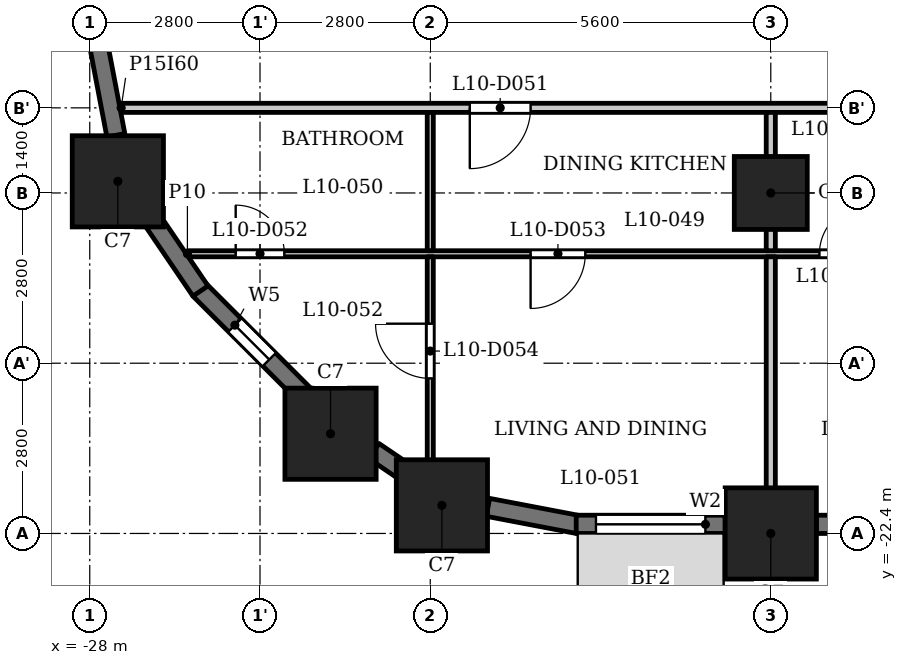
"""IFC4 building model, lengths in metres.
Left out: names, types, materials, properties, quantities, classifications, styles, units other than length and angle.
Written with IfcOpenShell. Run it as: python <this file> out.ifc"""

import sys

from ifc_helpers import new_model, si_unit, direction, frame, frame_2d, origin, origin_2d, place, context, subcontext, project, spatial, rectangle, extrude, element, fill, save


model = new_model("IFC4")
c1 = context("Model", 3, precision=1e-05, world=origin(), true_north=direction((0.0, 1.0)))
c2 = subcontext(c1, "Body", "Model", "MODEL_VIEW")
j1 = project(units=[si_unit("LENGTHUNIT", "METRE"), si_unit("PLANEANGLEUNIT", "RADIAN")], contexts=[c1])
p1 = place(None, origin())
s1 = spatial("IfcSite", under=j1, at=p1, CompositionType="ELEMENT")
p2 = place(p1, origin())
s2 = spatial("IfcBuilding", under=s1, at=p2, CompositionType="ELEMENT")
p3 = place(p2, frame((0.0, 0.0, 44.5)))
s3 = spatial("IfcBuildingStorey", under=s2, at=p3, CompositionType="ELEMENT", Elevation=44.5)
for number, where, z_axis, x_axis in (
    (1, (-22.209, -21.938, 0.0), (0.0, 0.0, 1.0), (1.0, 0.0, 0.0)),
    (2, (-16.8, -22.4, 0.0), (0.0, 0.0, 1.0), (1.0, 0.0, 0.0)),
    (3, (-27.538, -16.609, 0.0), (0.0, 0.0, 1.0), (1.0, 0.0, 0.0)),
    (4, (-24.04, -20.76, 0.0), (0.0, 0.0, 1.0), (1.0, 0.0, 0.0)),
):
    element("IfcColumn", number, at=place(p3, frame(where, z_axis=z_axis, x_axis=x_axis)), inside=s3, PredefinedType="COLUMN", context=c2, shape_type="SweptSolid", body=[
        extrude(rectangle(XDim=1.5, YDim=1.5, at=origin_2d()), origin(), (0.0, 0.0, 1.0), 3.5),
    ])
p4 = place(p3, frame((-16.8, -16.8, 0.0), z_axis=(0.0, 0.0, 1.0), x_axis=(1.0, 0.0, 0.0)))
e5 = element("IfcColumn", 5, at=p4, inside=s3, PredefinedType="COLUMN", context=c2, shape_type="SweptSolid", body=[
    extrude(rectangle(XDim=1.2, YDim=1.2, at=origin_2d()), origin(), (0.0, 0.0, 1.0), 3.5),
])
p5 = place(p3, frame((-26.197, -18.391, 0.0), z_axis=(0.0, 0.0, 1.0), x_axis=(0.707106781187, -0.707106781187, 0.0)))
e6 = element("IfcWall", 6, at=p5, inside=s3, PredefinedType="SOLIDWALL", context=c2, shape_type="SweptSolid", body=[
    extrude(rectangle(XDim=2.45, YDim=0.3, at=frame_2d((1.225, 0.0))), origin(), (0.0, 0.0, 1.0), 2.35),
])
p6 = place(p5, frame((0.825, 0.0, 0.6)))
e7 = element("IfcOpeningElement", 7, at=p6, cuts=e6, PredefinedType="OPENING", context=c2, shape_type="SweptSolid", body=[
    extrude(rectangle(XDim=0.8, YDim=1.55, at=frame_2d((0.4, 0.775))), frame((0.0, 0.16, 0.0), z_axis=(0.0, -1.0, 0.0), x_axis=(1.0, 0.0, 0.0)), (0.0, 0.0, 1.0), 0.32),
])
p7 = place(p3, frame((-23.327, -21.045, 0.0), z_axis=(0.0, 0.0, 1.0), x_axis=(0.827080706709, -0.562083182981, 0.0)))
e8 = element("IfcWall", 8, at=p7, inside=s3, PredefinedType="SOLIDWALL", context=c2, shape_type="SweptSolid", body=[
    extrude(rectangle(XDim=0.677, YDim=0.3, at=frame_2d((0.339, 0.0))), origin(), (0.0, 0.0, 1.0), 3.2),
])
p8 = place(p3, frame((-21.451, -21.97, 0.0), z_axis=(0.0, 0.0, 1.0), x_axis=(0.982287454367, -0.187380247071, 0.0)))
e9 = element("IfcWall", 9, at=p8, inside=s3, PredefinedType="SOLIDWALL", context=c2, shape_type="SweptSolid", body=[
    extrude(rectangle(XDim=1.506, YDim=0.3, at=frame_2d((0.753, 0.0))), origin(), (0.0, 0.0, 1.0), 2.35),
])
p9 = place(p3, frame((-20.0, -22.25, 0.0), z_axis=(0.0, 0.0, 1.0), x_axis=(1.0, 0.0, 0.0)))
e10 = element("IfcWall", 10, at=p9, inside=s3, PredefinedType="SOLIDWALL", context=c2, shape_type="SweptSolid", body=[
    extrude(rectangle(XDim=2.45, YDim=0.3, at=frame_2d((1.225, 0.0))), origin(), (0.0, 0.0, 1.0), 2.35),
])
p10 = place(p9, frame((0.325, 0.0, 0.9)))
e11 = element("IfcOpeningElement", 11, at=p10, cuts=e10, PredefinedType="OPENING", context=c2, shape_type="SweptSolid", body=[
    extrude(rectangle(XDim=1.8, YDim=1.25, at=frame_2d((0.9, 0.625))), frame((0.0, 0.16, 0.0), z_axis=(0.0, -1.0, 0.0), x_axis=(1.0, 0.0, 0.0)), (0.0, 0.0, 1.0), 0.32),
])
p11 = place(p3, frame((-16.05, -22.25, 0.0), z_axis=(0.0, 0.0, 1.0), x_axis=(1.0, 0.0, 0.0)))
e12 = element("IfcWall", 12, at=p11, inside=s3, PredefinedType="SOLIDWALL", context=c2, shape_type="SweptSolid", body=[
    extrude(rectangle(XDim=4.1, YDim=0.3, at=frame_2d((2.05, 0.0))), origin(), (0.0, 0.0, 1.0), 2.35),
])
p12 = place(p11, frame((0.25, 0.0, 1.2)))
e13 = element("IfcOpeningElement", 13, at=p12, cuts=e12, PredefinedType="OPENING", context=c2, shape_type="SweptSolid", body=[
    extrude(rectangle(XDim=3.6, YDim=0.95, at=frame_2d((1.8, 0.475))), frame((0.0, 0.16, 0.0), z_axis=(0.0, -1.0, 0.0), x_axis=(1.0, 0.0, 0.0)), (0.0, 0.0, 1.0), 0.32),
])
for number, where, z_axis, x_axis in (
    (14, (-27.853, -14.372, 0.0), (0.0, 0.0, 1.0), (0.187, -0.982, 0.0)),
    (15, (-27.025, -17.167, 0.0), (0.0, 0.0, 1.0), (0.562, -0.827, 0.0)),
):
    element("IfcWall", number, at=place(p3, frame(where, z_axis=z_axis, x_axis=x_axis)), inside=s3, PredefinedType="SOLIDWALL", context=c2, shape_type="SweptSolid", body=[
        extrude(rectangle(XDim=1.506, YDim=0.3, at=frame_2d((0.753, 0.0))), origin(), (0.0, 0.0, 1.0), 2.35),
    ])
p13 = place(p3, frame((-26.394, -17.8, 0.0), z_axis=(0.0, 0.0, 1.0), x_axis=(1.0, 0.0, 0.0)))
e16 = element("IfcWall", 16, at=p13, inside=s3, PredefinedType="PARTITIONING", context=c2, shape_type="SweptSolid", body=[
    extrude(rectangle(XDim=53.126, YDim=0.1, at=frame_2d((26.563, 0.0))), origin(), (0.0, 0.0, 1.0), 3.2),
])
p14 = place(p13, frame((0.794, 0.0, 0.0)))
e17 = element("IfcOpeningElement", 17, at=p14, cuts=e16, PredefinedType="OPENING", context=c2, shape_type="SweptSolid", body=[
    extrude(rectangle(XDim=0.8, YDim=2.1, at=frame_2d((0.4, 1.05))), frame((0.0, 0.06, 0.0), z_axis=(0.0, -1.0, 0.0), x_axis=(1.0, 0.0, 0.0)), (0.0, 0.0, 1.0), 0.12),
])
p15 = place(p13, frame((5.644, 0.0, 0.0)))
e18 = element("IfcOpeningElement", 18, at=p15, cuts=e16, PredefinedType="OPENING", context=c2, shape_type="SweptSolid", body=[
    extrude(rectangle(XDim=0.9, YDim=2.1, at=frame_2d((0.45, 1.05))), frame((0.0, 0.06, 0.0), z_axis=(0.0, -1.0, 0.0), x_axis=(1.0, 0.0, 0.0)), (0.0, 0.0, 1.0), 0.12),
])
p16 = place(p13, frame((10.394, 0.0, 0.0)))
e19 = element("IfcOpeningElement", 19, at=p16, cuts=e16, PredefinedType="OPENING", context=c2, shape_type="SweptSolid", body=[
    extrude(rectangle(XDim=0.8, YDim=2.1, at=frame_2d((0.4, 1.05))), frame((0.0, 0.06, 0.0), z_axis=(0.0, -1.0, 0.0), x_axis=(1.0, 0.0, 0.0)), (0.0, 0.0, 1.0), 0.12),
])
p17 = place(p13, frame((13.244, 0.0, 0.0)))
e20 = element("IfcOpeningElement", 20, at=p17, cuts=e16, PredefinedType="OPENING", context=c2, shape_type="SweptSolid", body=[
    extrude(rectangle(XDim=0.9, YDim=2.1, at=frame_2d((0.45, 1.05))), frame((0.0, 0.06, 0.0), z_axis=(0.0, -1.0, 0.0), x_axis=(1.0, 0.0, 0.0)), (0.0, 0.0, 1.0), 0.12),
])
p18 = place(p13, frame((23.944, 0.0, 0.0)))
e21 = element("IfcOpeningElement", 21, at=p18, cuts=e16, PredefinedType="OPENING", context=c2, shape_type="SweptSolid", body=[
    extrude(rectangle(XDim=0.8, YDim=2.1, at=frame_2d((0.4, 1.05))), frame((0.0, 0.06, 0.0), z_axis=(0.0, -1.0, 0.0), x_axis=(1.0, 0.0, 0.0)), (0.0, 0.0, 1.0), 0.12),
])
p19 = place(p13, frame((22.194, 0.0, 0.0)))
e22 = element("IfcOpeningElement", 22, at=p19, cuts=e16, PredefinedType="OPENING", context=c2, shape_type="SweptSolid", body=[
    extrude(rectangle(XDim=0.9, YDim=2.1, at=frame_2d((0.45, 1.05))), frame((0.0, 0.06, 0.0), z_axis=(0.0, -1.0, 0.0), x_axis=(1.0, 0.0, 0.0)), (0.0, 0.0, 1.0), 0.12),
])
p20 = place(p13, frame((16.594, 0.0, 0.0)))
e23 = element("IfcOpeningElement", 23, at=p20, cuts=e16, PredefinedType="OPENING", context=c2, shape_type="SweptSolid", body=[
    extrude(rectangle(XDim=0.9, YDim=2.1, at=frame_2d((0.45, 1.05))), frame((0.0, 0.06, 0.0), z_axis=(0.0, -1.0, 0.0), x_axis=(1.0, 0.0, 0.0)), (0.0, 0.0, 1.0), 0.12),
])
p21 = place(p13, frame((18.844, 0.0, 0.0)))
e24 = element("IfcOpeningElement", 24, at=p21, cuts=e16, PredefinedType="OPENING", context=c2, shape_type="SweptSolid", body=[
    extrude(rectangle(XDim=0.9, YDim=2.1, at=frame_2d((0.45, 1.05))), frame((0.0, 0.06, 0.0), z_axis=(0.0, -1.0, 0.0), x_axis=(1.0, 0.0, 0.0)), (0.0, 0.0, 1.0), 0.12),
])
p22 = place(p13, frame((30.544, 0.0, 0.0)))
e25 = element("IfcOpeningElement", 25, at=p22, cuts=e16, PredefinedType="OPENING", context=c2, shape_type="SweptSolid", body=[
    extrude(rectangle(XDim=0.8, YDim=2.1, at=frame_2d((0.4, 1.05))), frame((0.0, 0.06, 0.0), z_axis=(0.0, -1.0, 0.0), x_axis=(1.0, 0.0, 0.0)), (0.0, 0.0, 1.0), 0.12),
])
p23 = place(p13, frame((27.294, 0.0, 0.0)))
e26 = element("IfcOpeningElement", 26, at=p23, cuts=e16, PredefinedType="OPENING", context=c2, shape_type="SweptSolid", body=[
    extrude(rectangle(XDim=0.9, YDim=2.1, at=frame_2d((0.45, 1.05))), frame((0.0, 0.06, 0.0), z_axis=(0.0, -1.0, 0.0), x_axis=(1.0, 0.0, 0.0)), (0.0, 0.0, 1.0), 0.12),
])
p24 = place(p13, frame((35.894, 0.0, 0.0)))
e27 = element("IfcOpeningElement", 27, at=p24, cuts=e16, PredefinedType="OPENING", context=c2, shape_type="SweptSolid", body=[
    extrude(rectangle(XDim=0.8, YDim=2.1, at=frame_2d((0.4, 1.05))), frame((0.0, 0.06, 0.0), z_axis=(0.0, -1.0, 0.0), x_axis=(1.0, 0.0, 0.0)), (0.0, 0.0, 1.0), 0.12),
])
p25 = place(p13, frame((33.644, 0.0, 0.0)))
e28 = element("IfcOpeningElement", 28, at=p25, cuts=e16, PredefinedType="OPENING", context=c2, shape_type="SweptSolid", body=[
    extrude(rectangle(XDim=0.9, YDim=2.1, at=frame_2d((0.45, 1.05))), frame((0.0, 0.06, 0.0), z_axis=(0.0, -1.0, 0.0), x_axis=(1.0, 0.0, 0.0)), (0.0, 0.0, 1.0), 0.12),
])
p26 = place(p13, frame((41.494, 0.0, 0.0)))
e29 = element("IfcOpeningElement", 29, at=p26, cuts=e16, PredefinedType="OPENING", context=c2, shape_type="SweptSolid", body=[
    extrude(rectangle(XDim=0.8, YDim=2.1, at=frame_2d((0.4, 1.05))), frame((0.0, 0.06, 0.0), z_axis=(0.0, -1.0, 0.0), x_axis=(1.0, 0.0, 0.0)), (0.0, 0.0, 1.0), 0.12),
])
p27 = place(p13, frame((38.744, 0.0, 0.0)))
e30 = element("IfcOpeningElement", 30, at=p27, cuts=e16, PredefinedType="OPENING", context=c2, shape_type="SweptSolid", body=[
    extrude(rectangle(XDim=0.9, YDim=2.1, at=frame_2d((0.45, 1.05))), frame((0.0, 0.06, 0.0), z_axis=(0.0, -1.0, 0.0), x_axis=(1.0, 0.0, 0.0)), (0.0, 0.0, 1.0), 0.12),
])
p28 = place(p13, frame((49.362, 0.0, 0.0)))
e31 = element("IfcOpeningElement", 31, at=p28, cuts=e16, PredefinedType="OPENING", context=c2, shape_type="SweptSolid", body=[
    extrude(rectangle(XDim=0.8, YDim=2.1, at=frame_2d((0.4, 1.05))), frame((0.0, 0.06, 0.0), z_axis=(0.0, -1.0, 0.0), x_axis=(1.0, 0.0, 0.0)), (0.0, 0.0, 1.0), 0.12),
])
p29 = place(p13, frame((45.094, 0.0, 0.0)))
e32 = element("IfcOpeningElement", 32, at=p29, cuts=e16, PredefinedType="OPENING", context=c2, shape_type="SweptSolid", body=[
    extrude(rectangle(XDim=0.9, YDim=2.1, at=frame_2d((0.45, 1.05))), frame((0.0, 0.06, 0.0), z_axis=(0.0, -1.0, 0.0), x_axis=(1.0, 0.0, 0.0)), (0.0, 0.0, 1.0), 0.12),
])
p30 = place(p3, frame((-27.484, -15.4, 0.0), z_axis=(0.0, 0.0, 1.0), x_axis=(1.0, 0.0, 0.0)))
e33 = element("IfcWall", 33, at=p30, inside=s3, PredefinedType="PARTITIONING", context=c2, shape_type="SweptSolid", body=[
    extrude(rectangle(XDim=54.968, YDim=0.15, at=frame_2d((27.484, 0.0))), origin(), (0.0, 0.0, 1.0), 3.2),
])
p31 = place(p30, frame((5.734, 0.0, 0.0)))
e34 = element("IfcOpeningElement", 34, at=p31, cuts=e33, PredefinedType="OPENING", context=c2, shape_type="SweptSolid", body=[
    extrude(rectangle(XDim=1.0, YDim=2.1, at=frame_2d((0.5, 1.05))), frame((0.0, 0.085, 0.0), z_axis=(0.0, -1.0, 0.0), x_axis=(1.0, 0.0, 0.0)), (0.0, 0.0, 1.0), 0.17),
])
p32 = place(p30, frame((13.334, 0.0, 0.0)))
e35 = element("IfcOpeningElement", 35, at=p32, cuts=e33, PredefinedType="OPENING", context=c2, shape_type="SweptSolid", body=[
    extrude(rectangle(XDim=1.0, YDim=2.1, at=frame_2d((0.5, 1.05))), frame((0.0, 0.085, 0.0), z_axis=(0.0, -1.0, 0.0), x_axis=(1.0, 0.0, 0.0)), (0.0, 0.0, 1.0), 0.17),
])
p33 = place(p30, frame((20.184, 0.0, 0.0)))
e36 = element("IfcOpeningElement", 36, at=p33, cuts=e33, PredefinedType="OPENING", context=c2, shape_type="SweptSolid", body=[
    extrude(rectangle(XDim=1.0, YDim=2.1, at=frame_2d((0.5, 1.05))), frame((0.0, 0.085, 0.0), z_axis=(0.0, -1.0, 0.0), x_axis=(1.0, 0.0, 0.0)), (0.0, 0.0, 1.0), 0.17),
])
p34 = place(p30, frame((29.384, 0.0, 0.0)))
e37 = element("IfcOpeningElement", 37, at=p34, cuts=e33, PredefinedType="OPENING", context=c2, shape_type="SweptSolid", body=[
    extrude(rectangle(XDim=1.0, YDim=2.1, at=frame_2d((0.5, 1.05))), frame((0.0, 0.085, 0.0), z_axis=(0.0, -1.0, 0.0), x_axis=(1.0, 0.0, 0.0)), (0.0, 0.0, 1.0), 0.17),
])
p35 = place(p30, frame((33.734, 0.0, 0.0)))
e38 = element("IfcOpeningElement", 38, at=p35, cuts=e33, PredefinedType="OPENING", context=c2, shape_type="SweptSolid", body=[
    extrude(rectangle(XDim=1.0, YDim=2.1, at=frame_2d((0.5, 1.05))), frame((0.0, 0.085, 0.0), z_axis=(0.0, -1.0, 0.0), x_axis=(1.0, 0.0, 0.0)), (0.0, 0.0, 1.0), 0.17),
])
p36 = place(p30, frame((39.584, 0.0, 0.0)))
e39 = element("IfcOpeningElement", 39, at=p36, cuts=e33, PredefinedType="OPENING", context=c2, shape_type="SweptSolid", body=[
    extrude(rectangle(XDim=1.0, YDim=2.1, at=frame_2d((0.5, 1.05))), frame((0.0, 0.085, 0.0), z_axis=(0.0, -1.0, 0.0), x_axis=(1.0, 0.0, 0.0)), (0.0, 0.0, 1.0), 0.17),
])
p37 = place(p30, frame((45.184, 0.0, 0.0)))
e40 = element("IfcOpeningElement", 40, at=p37, cuts=e33, PredefinedType="OPENING", context=c2, shape_type="SweptSolid", body=[
    extrude(rectangle(XDim=1.0, YDim=2.1, at=frame_2d((0.5, 1.05))), frame((0.0, 0.085, 0.0), z_axis=(0.0, -1.0, 0.0), x_axis=(1.0, 0.0, 0.0)), (0.0, 0.0, 1.0), 0.17),
])
p38 = place(p3, frame((-22.4, -21.72, 0.0), z_axis=(0.0, 0.0, 1.0), x_axis=(0.0, 1.0, 0.0)))
e41 = element("IfcWall", 41, at=p38, inside=s3, PredefinedType="PARTITIONING", context=c2, shape_type="SweptSolid", body=[
    extrude(rectangle(XDim=3.87, YDim=0.1, at=frame_2d((1.935, 0.0))), origin(), (0.0, 0.0, 1.0), 3.2),
])
p39 = place(p38, frame((1.87, 0.0, 0.0)))
e42 = element("IfcOpeningElement", 42, at=p39, cuts=e41, PredefinedType="OPENING", context=c2, shape_type="SweptSolid", body=[
    extrude(rectangle(XDim=0.9, YDim=2.1, at=frame_2d((0.45, 1.05))), frame((0.0, 0.06, 0.0), z_axis=(0.0, -1.0, 0.0), x_axis=(1.0, 0.0, 0.0)), (0.0, 0.0, 1.0), 0.12),
])
p40 = place(p3, frame((-22.4, -17.75, 0.0), z_axis=(0.0, 0.0, 1.0), x_axis=(0.0, 1.0, 0.0)))
e43 = element("IfcWall", 43, at=p40, inside=s3, PredefinedType="PARTITIONING", context=c2, shape_type="SweptSolid", body=[
    extrude(rectangle(XDim=2.275, YDim=0.1, at=frame_2d((1.137, 0.0))), origin(), (0.0, 0.0, 1.0), 3.2),
])
p41 = place(p3, frame((-16.8, -23.13, 0.0), z_axis=(0.0, 0.0, 1.0), x_axis=(0.0, 1.0, 0.0)))
e44 = element("IfcWall", 44, at=p41, inside=s3, PredefinedType="PARTITIONING", context=c2, shape_type="SweptSolid", body=[
    extrude(rectangle(XDim=5.28, YDim=0.15, at=frame_2d((2.64, 0.0))), origin(), (0.0, 0.0, 1.0), 3.2),
])
p42 = place(p3, frame((-16.8, -17.75, 0.0), z_axis=(0.0, 0.0, 1.0), x_axis=(0.0, 1.0, 0.0)))
e45 = element("IfcWall", 45, at=p42, inside=s3, PredefinedType="PARTITIONING", context=c2, shape_type="SweptSolid", body=[
    extrude(rectangle(XDim=2.275, YDim=0.15, at=frame_2d((1.137, 0.0))), origin(), (0.0, 0.0, 1.0), 3.2),
])
p43 = place(p31, origin())
e46 = element("IfcDoor", 46, at=p43, inside=s3, OperationType="SINGLE_SWING_LEFT", PredefinedType="DOOR", context=c2, shape_type="SweptSolid", body=[
    extrude(rectangle(XDim=1.0, YDim=2.1, at=frame_2d((0.5, 1.05))), frame((0.0, 0.025, 0.0), z_axis=(0.0, -1.0, 0.0), x_axis=(1.0, 0.0, 0.0)), (0.0, 0.0, 1.0), 0.05),
])
fill(e34, e46)
p44 = place(p14, origin())
e47 = element("IfcDoor", 47, at=p44, inside=s3, OperationType="SINGLE_SWING_RIGHT", PredefinedType="DOOR", context=c2, shape_type="SweptSolid", body=[
    extrude(rectangle(XDim=0.8, YDim=2.1, at=frame_2d((0.4, 1.05))), frame((0.0, 0.025, 0.0), z_axis=(0.0, -1.0, 0.0), x_axis=(1.0, 0.0, 0.0)), (0.0, 0.0, 1.0), 0.05),
])
fill(e17, e47)
p45 = place(p15, origin())
e48 = element("IfcDoor", 48, at=p45, inside=s3, OperationType="SINGLE_SWING_LEFT", PredefinedType="DOOR", context=c2, shape_type="SweptSolid", body=[
    extrude(rectangle(XDim=0.9, YDim=2.1, at=frame_2d((0.45, 1.05))), frame((0.0, 0.025, 0.0), z_axis=(0.0, -1.0, 0.0), x_axis=(1.0, 0.0, 0.0)), (0.0, 0.0, 1.0), 0.05),
])
fill(e18, e48)
p46 = place(p39, origin())
e49 = element("IfcDoor", 49, at=p46, inside=s3, OperationType="SINGLE_SWING_LEFT", PredefinedType="DOOR", context=c2, shape_type="SweptSolid", body=[
    extrude(rectangle(XDim=0.9, YDim=2.1, at=frame_2d((0.45, 1.05))), frame((0.0, 0.025, 0.0), z_axis=(0.0, -1.0, 0.0), x_axis=(1.0, 0.0, 0.0)), (0.0, 0.0, 1.0), 0.05),
])
fill(e42, e49)
p47 = place(p16, origin())
e50 = element("IfcDoor", 50, at=p47, inside=s3, OperationType="SINGLE_SWING_LEFT", PredefinedType="DOOR", context=c2, shape_type="SweptSolid", body=[
    extrude(rectangle(XDim=0.8, YDim=2.1, at=frame_2d((0.4, 1.05))), frame((0.0, 0.025, 0.0), z_axis=(0.0, -1.0, 0.0), x_axis=(1.0, 0.0, 0.0)), (0.0, 0.0, 1.0), 0.05),
])
fill(e19, e50)
p48 = place(p6, origin())
e51 = element("IfcWindow", 51, at=p48, inside=s3, PartitioningType="SINGLE_PANEL", PredefinedType="WINDOW", context=c2, shape_type="SweptSolid", body=[
    extrude(rectangle(XDim=0.8, YDim=1.55, at=frame_2d((0.4, 0.775))), frame((0.0, 0.03, 0.0), z_axis=(0.0, -1.0, 0.0), x_axis=(1.0, 0.0, 0.0)), (0.0, 0.0, 1.0), 0.06),
])
fill(e7, e51)
p49 = place(p10, origin())
e52 = element("IfcWindow", 52, at=p49, inside=s3, PartitioningType="SINGLE_PANEL", PredefinedType="WINDOW", context=c2, shape_type="SweptSolid", body=[
    extrude(rectangle(XDim=1.8, YDim=1.25, at=frame_2d((0.9, 0.625))), frame((0.0, 0.03, 0.0), z_axis=(0.0, -1.0, 0.0), x_axis=(1.0, 0.0, 0.0)), (0.0, 0.0, 1.0), 0.06),
])
fill(e11, e52)
save(model, sys.argv[1])
